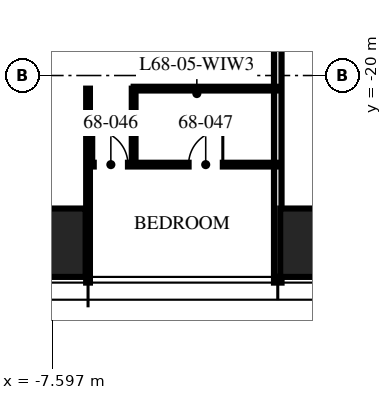
"""IFC4 building model, lengths in metres.
Left out: names, types, materials, properties, quantities, classifications, styles, units other than length and angle.
Written with IfcOpenShell. Run it as: python <this file> out.ifc"""

import sys

from ifc_helpers import new_model, si_unit, direction, frame, frame_2d, origin, origin_2d, place, context, subcontext, project, spatial, rectangle, hollow_rectangle, extrude, element, fill, save


model = new_model("IFC4")
c1 = context("Model", 3, precision=1e-05, world=origin(), true_north=direction((0.0, 1.0)))
c2 = subcontext(c1, "Body", "Model", "MODEL_VIEW")
j1 = project(units=[si_unit("LENGTHUNIT", "METRE"), si_unit("PLANEANGLEUNIT", "RADIAN")], contexts=[c1])
p1 = place(None, origin())
s1 = spatial("IfcSite", under=j1, at=p1, CompositionType="ELEMENT")
p2 = place(p1, origin())
s2 = spatial("IfcBuilding", under=s1, at=p2, CompositionType="ELEMENT")
p3 = place(p2, frame((0.0, 0.0, 270.75)))
s3 = spatial("IfcBuildingStorey", under=s2, at=p3, CompositionType="ELEMENT", Elevation=270.75)
for number, where, z_axis, x_axis in (
    (1, (0.0, -24.4, 0.0), (0.0, 0.0, 1.0), (1.0, 0.0, 0.0)),
    (2, (-8.32, -24.4, 0.0), (0.0, 0.0, 1.0), (1.0, 0.0, 0.0)),
):
    element("IfcColumn", number, at=place(p3, frame(where, z_axis=z_axis, x_axis=x_axis)), inside=s3, PredefinedType="COLUMN", context=c2, shape_type="SweptSolid", body=[
        extrude(hollow_rectangle(XDim=3.2, YDim=1.8, WallThickness=0.14, at=origin_2d()), origin(), (0.0, 0.0, 1.0), 3.75),
    ])
p4 = place(p3, frame((-6.656, -20.345, 0.0), z_axis=(0.0, 0.0, 1.0), x_axis=(0.0, -1.0, 0.0)))
e3 = element("IfcWall", 3, at=p4, inside=s3, PredefinedType="PARTITIONING", context=c2, shape_type="SweptSolid", body=[
    extrude(rectangle(XDim=5.105, YDim=0.1, at=frame_2d((2.552, 0.0))), origin(), (0.0, 0.0, 1.0), 2.81),
])
p5 = place(p3, frame((-1.664, -12.8, 0.0), z_axis=(0.0, 0.0, 1.0), x_axis=(0.0, -1.0, 0.0)))
e4 = element("IfcWall", 4, at=p5, inside=s3, PredefinedType="PARTITIONING", context=c2, shape_type="SweptSolid", body=[
    extrude(rectangle(XDim=12.65, YDim=0.2, at=frame_2d((6.325, 0.0))), origin(), (0.0, 0.0, 1.0), 2.81),
])
p6 = place(p3, frame((-6.656, -22.345, 0.0), z_axis=(0.0, 0.0, 1.0), x_axis=(1.0, 0.0, 0.0)))
e5 = element("IfcWall", 5, at=p6, inside=s3, PredefinedType="PARTITIONING", context=c2, shape_type="SweptSolid", body=[
    extrude(rectangle(XDim=4.992, YDim=0.1, at=frame_2d((2.496, 0.0))), origin(), (0.0, 0.0, 1.0), 2.71),
])
p7 = place(p6, frame((0.15, 0.0, 0.0)))
e6 = element("IfcOpeningElement", 6, at=p7, cuts=e5, PredefinedType="OPENING", context=c2, shape_type="SweptSolid", body=[
    extrude(rectangle(XDim=0.9, YDim=2.1, at=frame_2d((0.45, 1.05))), frame((0.0, 0.06, 0.0), z_axis=(0.0, -1.0, 0.0), x_axis=(1.0, 0.0, 0.0)), (0.0, 0.0, 1.0), 0.12),
])
p8 = place(p6, frame((2.646, 0.0, 0.0)))
e7 = element("IfcOpeningElement", 7, at=p8, cuts=e5, PredefinedType="OPENING", context=c2, shape_type="SweptSolid", body=[
    extrude(rectangle(XDim=0.9, YDim=2.1, at=frame_2d((0.45, 1.05))), frame((0.0, 0.06, 0.0), z_axis=(0.0, -1.0, 0.0), x_axis=(1.0, 0.0, 0.0)), (0.0, 0.0, 1.0), 0.12),
])
p9 = place(p3, frame((-5.456, -20.345, 0.0), z_axis=(0.0, 0.0, 1.0), x_axis=(0.0, -1.0, 0.0)))
e8 = element("IfcWall", 8, at=p9, inside=s3, PredefinedType="PARTITIONING", context=c2, shape_type="SweptSolid", body=[
    extrude(rectangle(XDim=2.0, YDim=0.1, at=frame_2d((1.0, 0.0))), origin(), (0.0, 0.0, 1.0), 3.5),
])
p10 = place(p3, frame((-5.456, -20.345, 0.0), z_axis=(0.0, 0.0, 1.0), x_axis=(1.0, 0.0, 0.0)))
e9 = element("IfcWall", 9, at=p10, inside=s3, PredefinedType="PARTITIONING", context=c2, shape_type="SweptSolid", body=[
    extrude(rectangle(XDim=3.792, YDim=0.1, at=frame_2d((1.896, 0.0))), origin(), (0.0, 0.0, 1.0), 2.71),
])
p11 = place(p7, origin())
e10 = element("IfcDoor", 10, at=p11, inside=s3, OperationType="SINGLE_SWING_LEFT", PredefinedType="DOOR", context=c2, shape_type="SweptSolid", body=[
    extrude(rectangle(XDim=0.9, YDim=2.1, at=frame_2d((0.45, 1.05))), frame((0.0, 0.025, 0.0), z_axis=(0.0, -1.0, 0.0), x_axis=(1.0, 0.0, 0.0)), (0.0, 0.0, 1.0), 0.05),
])
fill(e6, e10)
p12 = place(p8, origin())
e11 = element("IfcDoor", 11, at=p12, inside=s3, OperationType="SINGLE_SWING_RIGHT", PredefinedType="DOOR", context=c2, shape_type="SweptSolid", body=[
    extrude(rectangle(XDim=0.9, YDim=2.1, at=frame_2d((0.45, 1.05))), frame((0.0, 0.025, 0.0), z_axis=(0.0, -1.0, 0.0), x_axis=(1.0, 0.0, 0.0)), (0.0, 0.0, 1.0), 0.05),
])
fill(e7, e11)
save(model, sys.argv[1])
